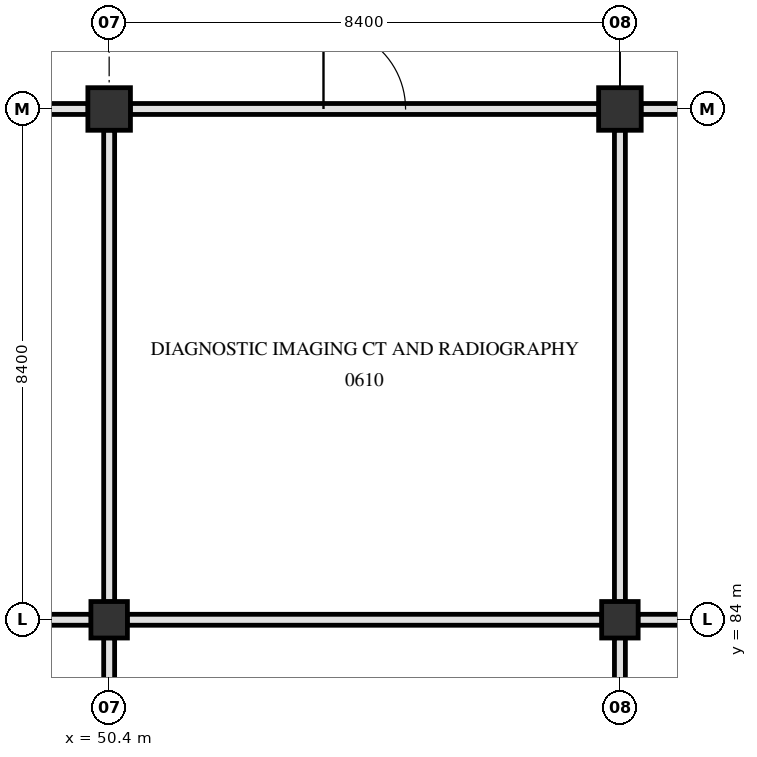
"""IFC4 building model, lengths in metres.
Left out: names, types, materials, properties, quantities, classifications, styles, units other than length and angle.
Written with IfcOpenShell. Run it as: python <this file> out.ifc"""

import sys

from ifc_helpers import new_model, si_unit, direction, frame, frame_2d, origin, origin_2d, place, context, subcontext, project, spatial, rectangle, extrude, element, fill, save


model = new_model("IFC4")
c1 = context("Model", 3, precision=1e-05, world=origin(), true_north=direction((0.0, 1.0)))
c2 = subcontext(c1, "Body", "Model", "MODEL_VIEW")
j1 = project(units=[si_unit("LENGTHUNIT", "METRE"), si_unit("PLANEANGLEUNIT", "RADIAN")], contexts=[c1])
p1 = place(None, origin())
s1 = spatial("IfcSite", under=j1, at=p1, CompositionType="ELEMENT")
p2 = place(p1, origin())
s2 = spatial("IfcBuilding", under=s1, at=p2, CompositionType="ELEMENT")
p3 = place(p2, origin())
s3 = spatial("IfcBuildingStorey", under=s2, at=p3, CompositionType="ELEMENT", Elevation=0.0)
p4 = place(p3, frame((50.4, 84.0, 0.0), z_axis=(0.0, 0.0, 1.0), x_axis=(1.0, 0.0, 0.0)))
e1 = element("IfcColumn", 1, at=p4, inside=s3, PredefinedType="COLUMN", context=c2, shape_type="SweptSolid", body=[
    extrude(rectangle(XDim=0.6, YDim=0.6, at=origin_2d()), origin(), (0.0, 0.0, 1.0), 4.8),
])
p5 = place(p3, frame((50.4, 92.4, 0.0), z_axis=(0.0, 0.0, 1.0), x_axis=(1.0, 0.0, 0.0)))
e2 = element("IfcColumn", 2, at=p5, inside=s3, PredefinedType="COLUMN", context=c2, shape_type="SweptSolid", body=[
    extrude(rectangle(XDim=0.7, YDim=0.7, at=origin_2d()), origin(), (0.0, 0.0, 1.0), 4.8),
])
p6 = place(p3, frame((58.8, 84.0, 0.0), z_axis=(0.0, 0.0, 1.0), x_axis=(1.0, 0.0, 0.0)))
e3 = element("IfcColumn", 3, at=p6, inside=s3, PredefinedType="COLUMN", context=c2, shape_type="SweptSolid", body=[
    extrude(rectangle(XDim=0.6, YDim=0.6, at=origin_2d()), origin(), (0.0, 0.0, 1.0), 4.8),
])
p7 = place(p3, frame((58.8, 92.4, 0.0), z_axis=(0.0, 0.0, 1.0), x_axis=(1.0, 0.0, 0.0)))
e4 = element("IfcColumn", 4, at=p7, inside=s3, PredefinedType="COLUMN", context=c2, shape_type="SweptSolid", body=[
    extrude(rectangle(XDim=0.7, YDim=0.7, at=origin_2d()), origin(), (0.0, 0.0, 1.0), 4.8),
])
p8 = place(p3, frame((44.65, 84.0, 0.0), z_axis=(0.0, 0.0, 1.0), x_axis=(1.0, 0.0, 0.0)))
e5 = element("IfcWall", 5, at=p8, inside=s3, PredefinedType="PARTITIONING", context=c2, shape_type="SweptSolid", body=[
    extrude(rectangle(XDim=5.455, YDim=0.18, at=frame_2d((2.728, 0.0))), origin(), (0.0, 0.0, 1.0), 3.84),
])
p9 = place(p3, frame((50.695, 84.0, 0.0), z_axis=(0.0, 0.0, 1.0), x_axis=(1.0, 0.0, 0.0)))
e6 = element("IfcWall", 6, at=p9, inside=s3, PredefinedType="PARTITIONING", context=c2, shape_type="SweptSolid", body=[
    extrude(rectangle(XDim=7.81, YDim=0.18, at=frame_2d((3.905, 0.0))), origin(), (0.0, 0.0, 1.0), 3.84),
])
p10 = place(p3, frame((59.095, 84.0, 0.0), z_axis=(0.0, 0.0, 1.0), x_axis=(1.0, 0.0, 0.0)))
e7 = element("IfcWall", 7, at=p10, inside=s3, PredefinedType="PARTITIONING", context=c2, shape_type="SweptSolid", body=[
    extrude(rectangle(XDim=7.81, YDim=0.18, at=frame_2d((3.905, 0.0))), origin(), (0.0, 0.0, 1.0), 3.84),
])
p11 = place(p3, frame((44.65, 92.4, 0.0), z_axis=(0.0, 0.0, 1.0), x_axis=(1.0, 0.0, 0.0)))
e8 = element("IfcWall", 8, at=p11, inside=s3, PredefinedType="PARTITIONING", context=c2, shape_type="SweptSolid", body=[
    extrude(rectangle(XDim=5.405, YDim=0.18, at=frame_2d((2.703, 0.0))), origin(), (0.0, 0.0, 1.0), 3.84),
])
p12 = place(p11, frame((2.242, 0.0, 0.0)))
e9 = element("IfcOpeningElement", 9, at=p12, cuts=e8, PredefinedType="OPENING", context=c2, shape_type="SweptSolid", body=[
    extrude(rectangle(XDim=0.92, YDim=2.08, at=frame_2d((0.46, 1.04))), frame((0.0, 0.1, 0.0), z_axis=(0.0, -1.0, 0.0), x_axis=(1.0, 0.0, 0.0)), (0.0, 0.0, 1.0), 0.2),
])
p13 = place(p3, frame((50.745, 92.4, 0.0), z_axis=(0.0, 0.0, 1.0), x_axis=(1.0, 0.0, 0.0)))
e10 = element("IfcWall", 10, at=p13, inside=s3, PredefinedType="PARTITIONING", context=c2, shape_type="SweptSolid", body=[
    extrude(rectangle(XDim=7.71, YDim=0.18, at=frame_2d((3.855, 0.0))), origin(), (0.0, 0.0, 1.0), 3.84),
])
p14 = place(p13, frame((3.18, 0.0, 0.0)))
e11 = element("IfcOpeningElement", 11, at=p14, cuts=e10, PredefinedType="OPENING", context=c2, shape_type="SweptSolid", body=[
    extrude(rectangle(XDim=1.35, YDim=2.2, at=frame_2d((0.675, 1.1))), frame((0.0, 0.1, 0.0), z_axis=(0.0, -1.0, 0.0), x_axis=(1.0, 0.0, 0.0)), (0.0, 0.0, 1.0), 0.2),
])
p15 = place(p3, frame((59.145, 92.4, 0.0), z_axis=(0.0, 0.0, 1.0), x_axis=(1.0, 0.0, 0.0)))
e12 = element("IfcWall", 12, at=p15, inside=s3, PredefinedType="PARTITIONING", context=c2, shape_type="SweptSolid", body=[
    extrude(rectangle(XDim=7.61, YDim=0.18, at=frame_2d((3.805, 0.0))), origin(), (0.0, 0.0, 1.0), 3.84),
])
p16 = place(p15, frame((3.33, 0.0, 0.0)))
e13 = element("IfcOpeningElement", 13, at=p16, cuts=e12, PredefinedType="OPENING", context=c2, shape_type="SweptSolid", body=[
    extrude(rectangle(XDim=0.95, YDim=2.1, at=frame_2d((0.475, 1.05))), frame((0.0, 0.1, 0.0), z_axis=(0.0, -1.0, 0.0), x_axis=(1.0, 0.0, 0.0)), (0.0, 0.0, 1.0), 0.2),
])
p17 = place(p3, frame((50.4, 78.315, 0.0), z_axis=(0.0, 0.0, 1.0), x_axis=(0.0, 1.0, 0.0)))
e14 = element("IfcWall", 14, at=p17, inside=s3, PredefinedType="PARTITIONING", context=c2, shape_type="SweptSolid", body=[
    extrude(rectangle(XDim=5.39, YDim=0.18, at=frame_2d((2.695, 0.0))), origin(), (0.0, 0.0, 1.0), 3.89),
])
p18 = place(p3, frame((50.4, 84.295, 0.0), z_axis=(0.0, 0.0, 1.0), x_axis=(0.0, 1.0, 0.0)))
e15 = element("IfcWall", 15, at=p18, inside=s3, PredefinedType="PARTITIONING", context=c2, shape_type="SweptSolid", body=[
    extrude(rectangle(XDim=7.76, YDim=0.18, at=frame_2d((3.88, 0.0))), origin(), (0.0, 0.0, 1.0), 3.89),
])
p19 = place(p3, frame((58.8, 78.315, 0.0), z_axis=(0.0, 0.0, 1.0), x_axis=(0.0, 1.0, 0.0)))
e16 = element("IfcWall", 16, at=p19, inside=s3, PredefinedType="PARTITIONING", context=c2, shape_type="SweptSolid", body=[
    extrude(rectangle(XDim=5.39, YDim=0.18, at=frame_2d((2.695, 0.0))), origin(), (0.0, 0.0, 1.0), 3.89),
])
p20 = place(p3, frame((58.8, 84.295, 0.0), z_axis=(0.0, 0.0, 1.0), x_axis=(0.0, 1.0, 0.0)))
e17 = element("IfcWall", 17, at=p20, inside=s3, PredefinedType="PARTITIONING", context=c2, shape_type="SweptSolid", body=[
    extrude(rectangle(XDim=7.76, YDim=0.18, at=frame_2d((3.88, 0.0))), origin(), (0.0, 0.0, 1.0), 3.89),
])
p21 = place(p14, origin())
e18 = element("IfcDoor", 18, at=p21, inside=s3, OperationType="SINGLE_SWING_LEFT", PredefinedType="DOOR", context=c2, shape_type="SweptSolid", body=[
    extrude(rectangle(XDim=1.35, YDim=2.2, at=frame_2d((0.675, 1.1))), frame((0.0, 0.025, 0.0), z_axis=(0.0, -1.0, 0.0), x_axis=(1.0, 0.0, 0.0)), (0.0, 0.0, 1.0), 0.05),
])
fill(e11, e18)
save(model, sys.argv[1])
